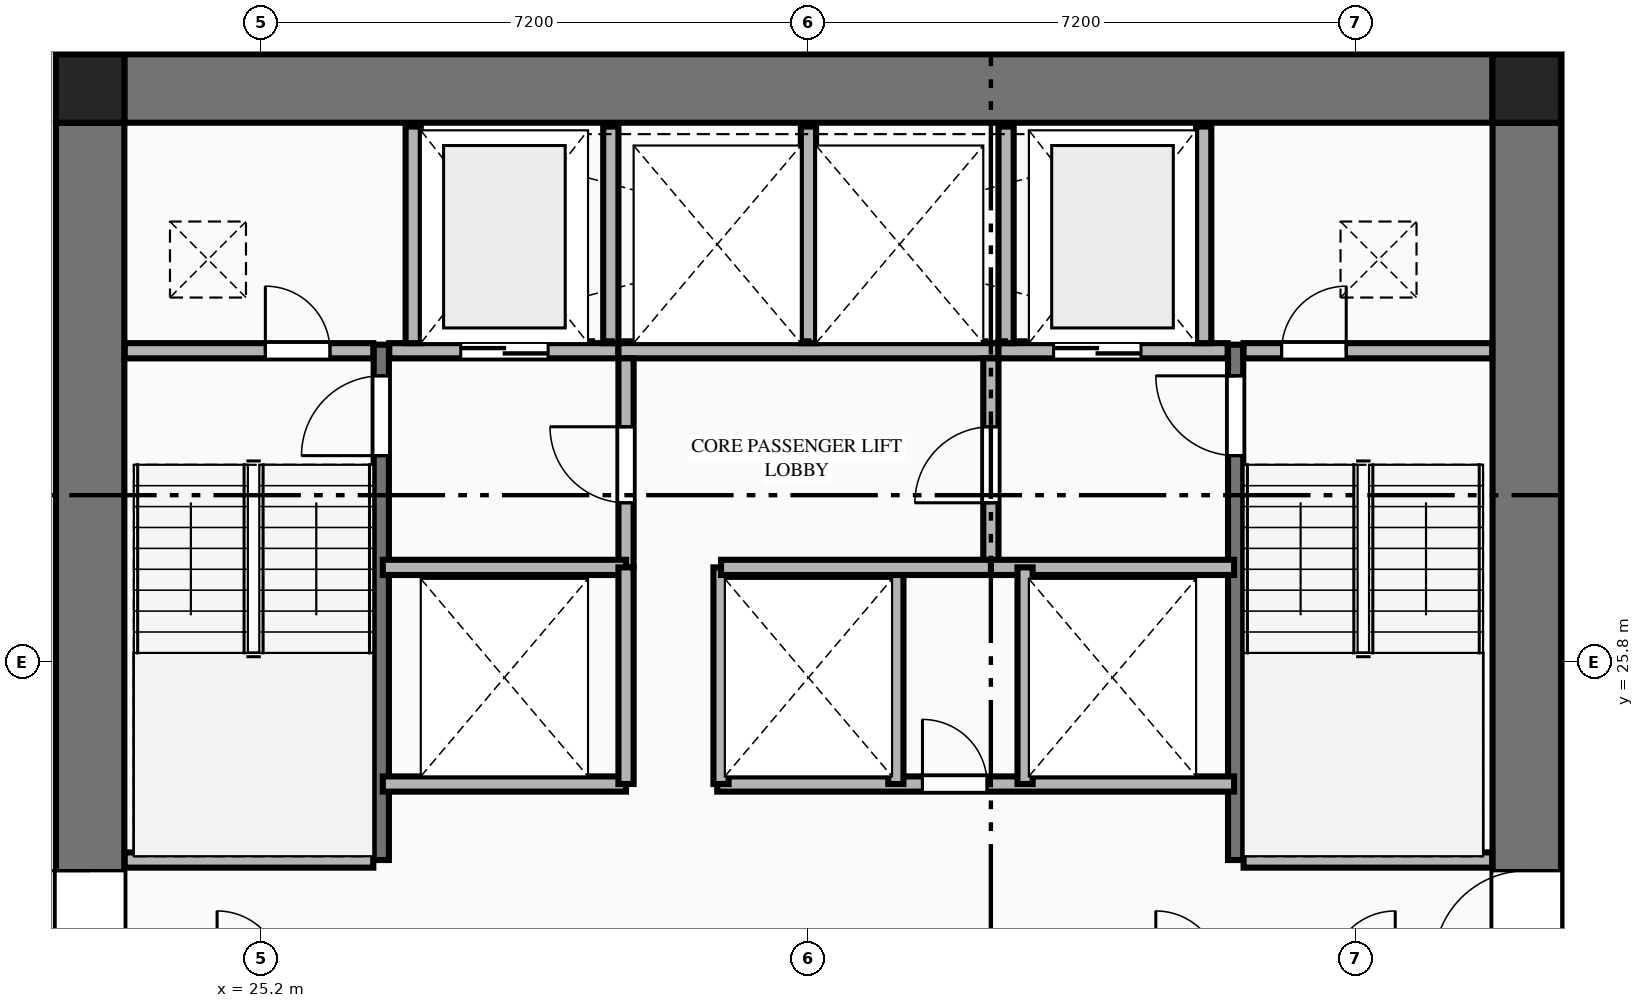
"""IFC4 building model, lengths in metres.
Left out: names, types, materials, properties, quantities, classifications, styles, units other than length and angle.
Written with IfcOpenShell. Run it as: python <this file> out.ifc"""

import sys

from ifc_helpers import new_model, si_unit, direction, frame, frame_2d, origin, origin_2d, place, context, subcontext, project, spatial, rectangle, extrude, element, fill, save


model = new_model("IFC4")
c1 = context("Model", 3, precision=1e-05, world=origin(), true_north=direction((0.0, 1.0)))
c2 = subcontext(c1, "Body", "Model", "MODEL_VIEW")
j1 = project(units=[si_unit("LENGTHUNIT", "METRE"), si_unit("PLANEANGLEUNIT", "RADIAN")], contexts=[c1])
p1 = place(None, origin())
s1 = spatial("IfcSite", under=j1, at=p1, CompositionType="ELEMENT")
p2 = place(p1, origin())
s2 = spatial("IfcBuilding", under=s1, at=p2, CompositionType="ELEMENT")
p3 = place(p2, frame((0.0, 0.0, 49.75)))
s3 = spatial("IfcBuildingStorey", under=s2, at=p3, CompositionType="ELEMENT", Elevation=49.75)
for number, where, z_axis, x_axis in (
    (1, (41.85, 33.35, 0.0), (0.0, 0.0, 1.0), (1.0, 0.0, 0.0)),
    (2, (22.95, 33.35, 0.0), (0.0, 0.0, 1.0), (1.0, 0.0, 0.0)),
):
    element("IfcColumn", number, at=place(p3, frame(where, z_axis=z_axis, x_axis=x_axis)), inside=s3, PredefinedType="COLUMN", context=c2, shape_type="SweptSolid", body=[
        extrude(rectangle(XDim=0.9, YDim=0.9, at=origin_2d()), origin(), (0.0, 0.0, 1.0), 3.55),
    ])
p4 = place(p3, frame((23.4, 33.35, 0.0), z_axis=(0.0, 0.0, 1.0), x_axis=(1.0, 0.0, 0.0)))
e3 = element("IfcWall", 3, at=p4, inside=s3, PredefinedType="SHEAR", context=c2, shape_type="SweptSolid", body=[
    extrude(rectangle(XDim=18.0, YDim=0.9, at=frame_2d((9.0, 0.0))), origin(), (0.0, 0.0, 1.0), 3.33),
])
p5 = place(p3, frame((22.95, 18.9, 0.0), z_axis=(0.0, 0.0, 1.0), x_axis=(0.0, 1.0, 0.0)))
e4 = element("IfcWall", 4, at=p5, inside=s3, PredefinedType="SHEAR", context=c2, shape_type="SweptSolid", body=[
    extrude(rectangle(XDim=14.0, YDim=0.9, at=frame_2d((7.0, 0.0))), origin(), (0.0, 0.0, 1.0), 3.33),
])
p6 = place(p5, frame((2.94, 0.0, 0.0)))
e5 = element("IfcOpeningElement", 5, at=p6, cuts=e4, PredefinedType="OPENING", context=c2, shape_type="SweptSolid", body=[
    extrude(rectangle(XDim=1.22, YDim=2.25, at=frame_2d((0.61, 1.125))), frame((0.0, 0.46, 0.0), z_axis=(0.0, -1.0, 0.0), x_axis=(1.0, 0.0, 0.0)), (0.0, 0.0, 1.0), 0.92),
])
p7 = place(p3, frame((41.85, 18.9, 0.0), z_axis=(0.0, 0.0, 1.0), x_axis=(0.0, 1.0, 0.0)))
e6 = element("IfcWall", 6, at=p7, inside=s3, PredefinedType="SHEAR", context=c2, shape_type="SweptSolid", body=[
    extrude(rectangle(XDim=14.0, YDim=0.9, at=frame_2d((7.0, 0.0))), origin(), (0.0, 0.0, 1.0), 3.33),
])
p8 = place(p7, frame((2.94, 0.0, 0.0)))
e7 = element("IfcOpeningElement", 7, at=p8, cuts=e6, PredefinedType="OPENING", context=c2, shape_type="SweptSolid", body=[
    extrude(rectangle(XDim=1.22, YDim=2.25, at=frame_2d((0.61, 1.125))), frame((0.0, 0.46, 0.0), z_axis=(0.0, -1.0, 0.0), x_axis=(1.0, 0.0, 0.0)), (0.0, 0.0, 1.0), 0.92),
])
p9 = place(p3, frame((26.78, 23.2, 0.0), z_axis=(0.0, 0.0, 1.0), x_axis=(0.0, 1.0, 0.0)))
e8 = element("IfcWall", 8, at=p9, inside=s3, PredefinedType="SHEAR", context=c2, shape_type="SweptSolid", body=[
    extrude(rectangle(XDim=6.78, YDim=0.2, at=frame_2d((3.39, 0.0))), origin(), (0.0, 0.0, 1.0), 3.55),
])
p10 = place(p9, frame((5.32, 0.0, 0.0)))
e9 = element("IfcOpeningElement", 9, at=p10, cuts=e8, PredefinedType="OPENING", context=c2, shape_type="SweptSolid", body=[
    extrude(rectangle(XDim=1.05, YDim=2.15, at=frame_2d((0.525, 1.075))), frame((0.0, 0.11, 0.0), z_axis=(0.0, -1.0, 0.0), x_axis=(1.0, 0.0, 0.0)), (0.0, 0.0, 1.0), 0.22),
])
p11 = place(p3, frame((23.405, 23.2, 0.0), z_axis=(0.0, 0.0, 1.0), x_axis=(1.0, 0.0, 0.0)))
e10 = element("IfcWall", 10, at=p11, inside=s3, PredefinedType="PLUMBINGWALL", context=c2, shape_type="SweptSolid", body=[
    extrude(rectangle(XDim=3.27, YDim=0.2, at=frame_2d((1.635, 0.0))), origin(), (0.0, 0.0, 1.0), 3.33),
])
p12 = place(p3, frame((38.02, 23.2, 0.0), z_axis=(0.0, 0.0, 1.0), x_axis=(0.0, 1.0, 0.0)))
e11 = element("IfcWall", 11, at=p12, inside=s3, PredefinedType="SHEAR", context=c2, shape_type="SweptSolid", body=[
    extrude(rectangle(XDim=6.78, YDim=0.2, at=frame_2d((3.39, 0.0))), origin(), (0.0, 0.0, 1.0), 3.55),
])
p13 = place(p12, frame((5.32, 0.0, 0.0)))
e12 = element("IfcOpeningElement", 12, at=p13, cuts=e11, PredefinedType="OPENING", context=c2, shape_type="SweptSolid", body=[
    extrude(rectangle(XDim=1.05, YDim=2.15, at=frame_2d((0.525, 1.075))), frame((0.0, 0.11, 0.0), z_axis=(0.0, -1.0, 0.0), x_axis=(1.0, 0.0, 0.0)), (0.0, 0.0, 1.0), 0.22),
])
p14 = place(p3, frame((38.125, 23.2, 0.0), z_axis=(0.0, 0.0, 1.0), x_axis=(1.0, 0.0, 0.0)))
e13 = element("IfcWall", 13, at=p14, inside=s3, PredefinedType="PLUMBINGWALL", context=c2, shape_type="SweptSolid", body=[
    extrude(rectangle(XDim=3.27, YDim=0.2, at=frame_2d((1.635, 0.0))), origin(), (0.0, 0.0, 1.0), 3.33),
])
p15 = place(p3, frame((23.405, 29.9, 0.0), z_axis=(0.0, 0.0, 1.0), x_axis=(1.0, 0.0, 0.0)))
e14 = element("IfcWall", 14, at=p15, inside=s3, PredefinedType="PLUMBINGWALL", context=c2, shape_type="SweptSolid", body=[
    extrude(rectangle(XDim=3.27, YDim=0.2, at=frame_2d((1.635, 0.0))), origin(), (0.0, 0.0, 1.0), 3.33),
])
p16 = place(p15, frame((1.85, 0.0, 0.0)))
e15 = element("IfcOpeningElement", 15, at=p16, cuts=e14, PredefinedType="OPENING", context=c2, shape_type="SweptSolid", body=[
    extrude(rectangle(XDim=0.85, YDim=2.05, at=frame_2d((0.425, 1.025))), frame((0.0, 0.11, 0.0), z_axis=(0.0, -1.0, 0.0), x_axis=(1.0, 0.0, 0.0)), (0.0, 0.0, 1.0), 0.22),
])
p17 = place(p3, frame((26.885, 29.9, 0.0), z_axis=(0.0, 0.0, 1.0), x_axis=(1.0, 0.0, 0.0)))
e16 = element("IfcWall", 16, at=p17, inside=s3, PredefinedType="PLUMBINGWALL", context=c2, shape_type="SweptSolid", body=[
    extrude(rectangle(XDim=3.015, YDim=0.2, at=frame_2d((1.507, 0.0))), origin(), (0.0, 0.0, 1.0), 3.33),
])
p18 = place(p17, frame((0.94, 0.0, 0.0)))
e17 = element("IfcOpeningElement", 17, at=p18, cuts=e16, PredefinedType="OPENING", context=c2, shape_type="SweptSolid", body=[
    extrude(rectangle(XDim=1.15, YDim=2.2, at=frame_2d((0.575, 1.1))), frame((0.0, 0.11, 0.0), z_axis=(0.0, -1.0, 0.0), x_axis=(1.0, 0.0, 0.0)), (0.0, 0.0, 1.0), 0.22),
])
p19 = place(p3, frame((29.9, 29.9, 0.0), z_axis=(0.0, 0.0, 1.0), x_axis=(1.0, 0.0, 0.0)))
e18 = element("IfcWall", 18, at=p19, inside=s3, PredefinedType="PLUMBINGWALL", context=c2, shape_type="SweptSolid", body=[
    extrude(rectangle(XDim=5.0, YDim=0.2, at=frame_2d((2.5, 0.0))), origin(), (0.0, 0.0, 1.0), 3.33),
])
p20 = place(p3, frame((34.9, 29.9, 0.0), z_axis=(0.0, 0.0, 1.0), x_axis=(1.0, 0.0, 0.0)))
e19 = element("IfcWall", 19, at=p20, inside=s3, PredefinedType="PLUMBINGWALL", context=c2, shape_type="SweptSolid", body=[
    extrude(rectangle(XDim=3.015, YDim=0.2, at=frame_2d((1.508, 0.0))), origin(), (0.0, 0.0, 1.0), 3.33),
])
p21 = place(p20, frame((0.725, 0.0, 0.0)))
e20 = element("IfcOpeningElement", 20, at=p21, cuts=e19, PredefinedType="OPENING", context=c2, shape_type="SweptSolid", body=[
    extrude(rectangle(XDim=1.15, YDim=2.2, at=frame_2d((0.575, 1.1))), frame((0.0, 0.11, 0.0), z_axis=(0.0, -1.0, 0.0), x_axis=(1.0, 0.0, 0.0)), (0.0, 0.0, 1.0), 0.22),
])
p22 = place(p3, frame((38.125, 29.9, 0.0), z_axis=(0.0, 0.0, 1.0), x_axis=(1.0, 0.0, 0.0)))
e21 = element("IfcWall", 21, at=p22, inside=s3, PredefinedType="PLUMBINGWALL", context=c2, shape_type="SweptSolid", body=[
    extrude(rectangle(XDim=3.27, YDim=0.2, at=frame_2d((1.635, 0.0))), origin(), (0.0, 0.0, 1.0), 3.33),
])
p23 = place(p22, frame((0.5, 0.0, 0.0)))
e22 = element("IfcOpeningElement", 22, at=p23, cuts=e21, PredefinedType="OPENING", context=c2, shape_type="SweptSolid", body=[
    extrude(rectangle(XDim=0.85, YDim=2.05, at=frame_2d((0.425, 1.025))), frame((0.0, 0.11, 0.0), z_axis=(0.0, -1.0, 0.0), x_axis=(1.0, 0.0, 0.0)), (0.0, 0.0, 1.0), 0.22),
])
for number, where, z_axis, x_axis in (
    (23, (27.2, 30.0, 0.0), (0.0, 0.0, 1.0), (0.0, 1.0, 0.0)),
    (24, (29.8, 30.0, 0.0), (0.0, 0.0, 1.0), (0.0, 1.0, 0.0)),
    (25, (32.4, 30.0, 0.0), (0.0, 0.0, 1.0), (0.0, 1.0, 0.0)),
    (26, (35.0, 30.0, 0.0), (0.0, 0.0, 1.0), (0.0, 1.0, 0.0)),
    (27, (37.6, 30.0, 0.0), (0.0, 0.0, 1.0), (0.0, 1.0, 0.0)),
):
    element("IfcWall", number, at=place(p3, frame(where, z_axis=z_axis, x_axis=x_axis)), inside=s3, PredefinedType="PLUMBINGWALL", context=c2, shape_type="SweptSolid", body=[
        extrude(rectangle(XDim=2.85, YDim=0.2, at=frame_2d((1.425, 0.0))), origin(), (0.0, 0.0, 1.0), 3.33),
    ])
p24 = place(p3, frame((30.0, 27.05, 0.0), z_axis=(0.0, 0.0, 1.0), x_axis=(0.0, 1.0, 0.0)))
e28 = element("IfcWall", 28, at=p24, inside=s3, PredefinedType="PLUMBINGWALL", context=c2, shape_type="SweptSolid", body=[
    extrude(rectangle(XDim=2.75, YDim=0.2, at=frame_2d((1.375, 0.0))), origin(), (0.0, 0.0, 1.0), 3.33),
])
p25 = place(p24, frame((0.85, 0.0, 0.0)))
e29 = element("IfcOpeningElement", 29, at=p25, cuts=e28, PredefinedType="OPENING", context=c2, shape_type="SweptSolid", body=[
    extrude(rectangle(XDim=1.0, YDim=2.15, at=frame_2d((0.5, 1.075))), frame((0.0, 0.11, 0.0), z_axis=(0.0, -1.0, 0.0), x_axis=(1.0, 0.0, 0.0)), (0.0, 0.0, 1.0), 0.22),
])
p26 = place(p3, frame((26.8, 27.05, 0.0), z_axis=(0.0, 0.0, 1.0), x_axis=(1.0, 0.0, 0.0)))
e30 = element("IfcWall", 30, at=p26, inside=s3, PredefinedType="PLUMBINGWALL", context=c2, shape_type="SweptSolid", body=[
    extrude(rectangle(XDim=3.2, YDim=0.2, at=frame_2d((1.6, 0.0))), origin(), (0.0, 0.0, 1.0), 3.33),
])
p27 = place(p3, frame((34.8, 27.05, 0.0), z_axis=(0.0, 0.0, 1.0), x_axis=(0.0, 1.0, 0.0)))
e31 = element("IfcWall", 31, at=p27, inside=s3, PredefinedType="PLUMBINGWALL", context=c2, shape_type="SweptSolid", body=[
    extrude(rectangle(XDim=2.75, YDim=0.2, at=frame_2d((1.375, 0.0))), origin(), (0.0, 0.0, 1.0), 3.33),
])
p28 = place(p27, frame((0.85, 0.0, 0.0)))
e32 = element("IfcOpeningElement", 32, at=p28, cuts=e31, PredefinedType="OPENING", context=c2, shape_type="SweptSolid", body=[
    extrude(rectangle(XDim=1.0, YDim=2.15, at=frame_2d((0.5, 1.075))), frame((0.0, 0.11, 0.0), z_axis=(0.0, -1.0, 0.0), x_axis=(1.0, 0.0, 0.0)), (0.0, 0.0, 1.0), 0.22),
])
for number, where, z_axis, x_axis in (
    (33, (34.8, 27.05, 0.0), (0.0, 0.0, 1.0), (1.0, 0.0, 0.0)),
    (34, (26.8, 24.2, 0.0), (0.0, 0.0, 1.0), (1.0, 0.0, 0.0)),
):
    element("IfcWall", number, at=place(p3, frame(where, z_axis=z_axis, x_axis=x_axis)), inside=s3, PredefinedType="PLUMBINGWALL", context=c2, shape_type="SweptSolid", body=[
        extrude(rectangle(XDim=3.2, YDim=0.2, at=frame_2d((1.6, 0.0))), origin(), (0.0, 0.0, 1.0), 3.33),
    ])
p29 = place(p3, frame((30.0, 24.2, 0.0), z_axis=(0.0, 0.0, 1.0), x_axis=(0.0, 1.0, 0.0)))
e35 = element("IfcWall", 35, at=p29, inside=s3, PredefinedType="PLUMBINGWALL", context=c2, shape_type="SweptSolid", body=[
    extrude(rectangle(XDim=2.85, YDim=0.2, at=frame_2d((1.425, 0.0))), origin(), (0.0, 0.0, 1.0), 3.33),
])
p30 = place(p3, frame((31.2, 24.2, 0.0), z_axis=(0.0, 0.0, 1.0), x_axis=(1.0, 0.0, 0.0)))
e36 = element("IfcWall", 36, at=p30, inside=s3, PredefinedType="PLUMBINGWALL", context=c2, shape_type="SweptSolid", body=[
    extrude(rectangle(XDim=6.8, YDim=0.2, at=frame_2d((3.4, 0.0))), origin(), (0.0, 0.0, 1.0), 3.33),
])
p31 = place(p30, frame((2.7, 0.0, 0.0)))
e37 = element("IfcOpeningElement", 37, at=p31, cuts=e36, PredefinedType="OPENING", context=c2, shape_type="SweptSolid", body=[
    extrude(rectangle(XDim=0.85, YDim=2.05, at=frame_2d((0.425, 1.025))), frame((0.0, 0.11, 0.0), z_axis=(0.0, -1.0, 0.0), x_axis=(1.0, 0.0, 0.0)), (0.0, 0.0, 1.0), 0.22),
])
for number, where, z_axis, x_axis in (
    (38, (31.25, 24.2, 0.0), (0.0, 0.0, 1.0), (0.0, 1.0, 0.0)),
    (39, (33.55, 24.2, 0.0), (0.0, 0.0, 1.0), (0.0, 1.0, 0.0)),
    (40, (35.25, 24.2, 0.0), (0.0, 0.0, 1.0), (0.0, 1.0, 0.0)),
):
    element("IfcWall", number, at=place(p3, frame(where, z_axis=z_axis, x_axis=x_axis)), inside=s3, PredefinedType="PLUMBINGWALL", context=c2, shape_type="SweptSolid", body=[
        extrude(rectangle(XDim=2.85, YDim=0.2, at=frame_2d((1.425, 0.0))), origin(), (0.0, 0.0, 1.0), 3.33),
    ])
p32 = place(p3, frame((31.25, 27.05, 0.0), z_axis=(0.0, 0.0, 1.0), x_axis=(1.0, 0.0, 0.0)))
e41 = element("IfcWall", 41, at=p32, inside=s3, PredefinedType="PLUMBINGWALL", context=c2, shape_type="SweptSolid", body=[
    extrude(rectangle(XDim=3.55, YDim=0.2, at=frame_2d((1.775, 0.0))), origin(), (0.0, 0.0, 1.0), 3.33),
])
p33 = place(p6, origin())
e42 = element("IfcDoor", 42, at=p33, inside=s3, OperationType="SINGLE_SWING_RIGHT", PredefinedType="DOOR", context=c2, shape_type="SweptSolid", body=[
    extrude(rectangle(XDim=1.22, YDim=2.25, at=frame_2d((0.61, 1.125))), frame((0.0, 0.025, 0.0), z_axis=(0.0, -1.0, 0.0), x_axis=(1.0, 0.0, 0.0)), (0.0, 0.0, 1.0), 0.05),
])
fill(e5, e42)
p34 = place(p8, origin())
e43 = element("IfcDoor", 43, at=p34, inside=s3, OperationType="SINGLE_SWING_LEFT", PredefinedType="DOOR", context=c2, shape_type="SweptSolid", body=[
    extrude(rectangle(XDim=1.22, YDim=2.25, at=frame_2d((0.61, 1.125))), frame((0.0, 0.025, 0.0), z_axis=(0.0, -1.0, 0.0), x_axis=(1.0, 0.0, 0.0)), (0.0, 0.0, 1.0), 0.05),
])
fill(e7, e43)
p35 = place(p10, origin())
e44 = element("IfcDoor", 44, at=p35, inside=s3, OperationType="SINGLE_SWING_LEFT", PredefinedType="DOOR", context=c2, shape_type="SweptSolid", body=[
    extrude(rectangle(XDim=1.05, YDim=2.15, at=frame_2d((0.525, 1.075))), frame((0.0, 0.025, 0.0), z_axis=(0.0, -1.0, 0.0), x_axis=(1.0, 0.0, 0.0)), (0.0, 0.0, 1.0), 0.05),
])
fill(e9, e44)
p36 = place(p13, origin())
e45 = element("IfcDoor", 45, at=p36, inside=s3, OperationType="SINGLE_SWING_RIGHT", PredefinedType="DOOR", context=c2, shape_type="SweptSolid", body=[
    extrude(rectangle(XDim=1.05, YDim=2.15, at=frame_2d((0.525, 1.075))), frame((0.0, 0.025, 0.0), z_axis=(0.0, -1.0, 0.0), x_axis=(1.0, 0.0, 0.0)), (0.0, 0.0, 1.0), 0.05),
])
fill(e12, e45)
p37 = place(p16, origin())
e46 = element("IfcDoor", 46, at=p37, inside=s3, OperationType="SINGLE_SWING_LEFT", PredefinedType="DOOR", context=c2, shape_type="SweptSolid", body=[
    extrude(rectangle(XDim=0.85, YDim=2.05, at=frame_2d((0.425, 1.025))), frame((0.0, 0.025, 0.0), z_axis=(0.0, -1.0, 0.0), x_axis=(1.0, 0.0, 0.0)), (0.0, 0.0, 1.0), 0.05),
])
fill(e15, e46)
p38 = place(p23, origin())
e47 = element("IfcDoor", 47, at=p38, inside=s3, OperationType="SINGLE_SWING_RIGHT", PredefinedType="DOOR", context=c2, shape_type="SweptSolid", body=[
    extrude(rectangle(XDim=0.85, YDim=2.05, at=frame_2d((0.425, 1.025))), frame((0.0, 0.025, 0.0), z_axis=(0.0, -1.0, 0.0), x_axis=(1.0, 0.0, 0.0)), (0.0, 0.0, 1.0), 0.05),
])
fill(e22, e47)
p39 = place(p18, origin())
e48 = element("IfcDoor", 48, at=p39, inside=s3, OperationType="DOUBLE_DOOR_SLIDING", PredefinedType="DOOR", context=c2, shape_type="SweptSolid", body=[
    extrude(rectangle(XDim=1.15, YDim=2.2, at=frame_2d((0.575, 1.1))), frame((0.0, 0.025, 0.0), z_axis=(0.0, -1.0, 0.0), x_axis=(1.0, 0.0, 0.0)), (0.0, 0.0, 1.0), 0.05),
])
fill(e17, e48)
p40 = place(p21, origin())
e49 = element("IfcDoor", 49, at=p40, inside=s3, OperationType="DOUBLE_DOOR_SLIDING", PredefinedType="DOOR", context=c2, shape_type="SweptSolid", body=[
    extrude(rectangle(XDim=1.15, YDim=2.2, at=frame_2d((0.575, 1.1))), frame((0.0, 0.025, 0.0), z_axis=(0.0, -1.0, 0.0), x_axis=(1.0, 0.0, 0.0)), (0.0, 0.0, 1.0), 0.05),
])
fill(e20, e49)
p41 = place(p25, origin())
e50 = element("IfcDoor", 50, at=p41, inside=s3, OperationType="SINGLE_SWING_RIGHT", PredefinedType="DOOR", context=c2, shape_type="SweptSolid", body=[
    extrude(rectangle(XDim=1.0, YDim=2.15, at=frame_2d((0.5, 1.075))), frame((0.0, 0.025, 0.0), z_axis=(0.0, -1.0, 0.0), x_axis=(1.0, 0.0, 0.0)), (0.0, 0.0, 1.0), 0.05),
])
fill(e29, e50)
p42 = place(p28, origin())
e51 = element("IfcDoor", 51, at=p42, inside=s3, OperationType="SINGLE_SWING_LEFT", PredefinedType="DOOR", context=c2, shape_type="SweptSolid", body=[
    extrude(rectangle(XDim=1.0, YDim=2.15, at=frame_2d((0.5, 1.075))), frame((0.0, 0.025, 0.0), z_axis=(0.0, -1.0, 0.0), x_axis=(1.0, 0.0, 0.0)), (0.0, 0.0, 1.0), 0.05),
])
fill(e32, e51)
p43 = place(p31, origin())
e52 = element("IfcDoor", 52, at=p43, inside=s3, OperationType="SINGLE_SWING_LEFT", PredefinedType="DOOR", context=c2, shape_type="SweptSolid", body=[
    extrude(rectangle(XDim=0.85, YDim=2.05, at=frame_2d((0.425, 1.025))), frame((0.0, 0.025, 0.0), z_axis=(0.0, -1.0, 0.0), x_axis=(1.0, 0.0, 0.0)), (0.0, 0.0, 1.0), 0.05),
])
fill(e37, e52)
save(model, sys.argv[1])
